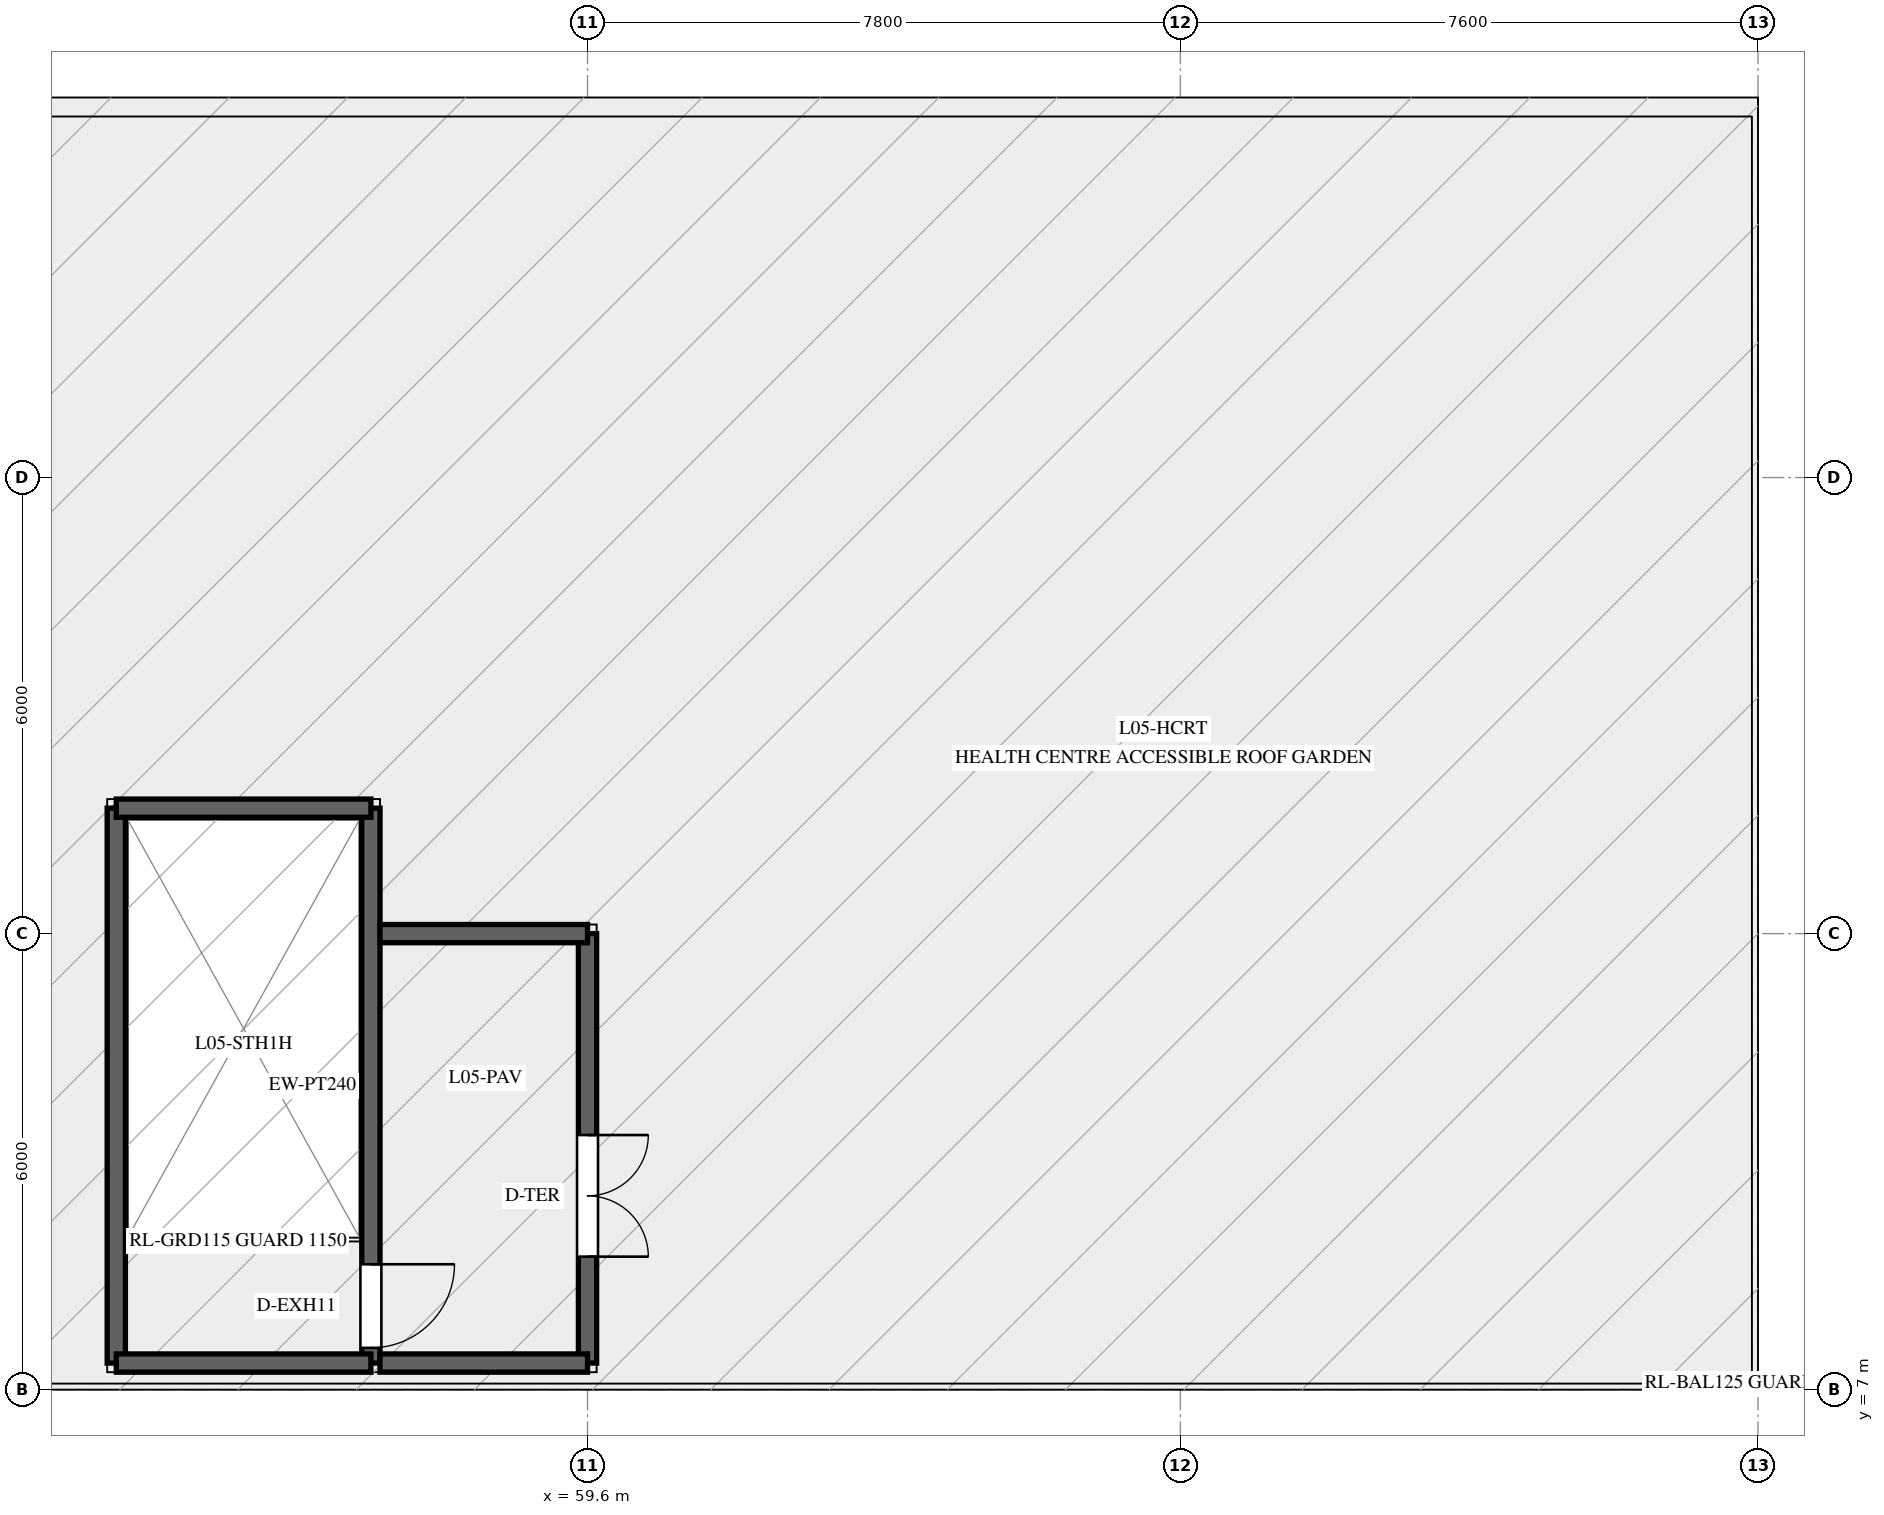
"""IFC4 building model, lengths in metres.
Left out: names, types, materials, properties, quantities, classifications, styles, units other than length and angle.
Written with IfcOpenShell. Run it as: python <this file> out.ifc"""

import sys

from ifc_helpers import new_model, si_unit, direction, frame, frame_2d, origin, place, context, subcontext, project, spatial, rectangle, extrude, element, fill, save


model = new_model("IFC4")
c1 = context("Model", 3, precision=1e-05, world=origin(), true_north=direction((0.0, 1.0)))
c2 = subcontext(c1, "Body", "Model", "MODEL_VIEW")
j1 = project(units=[si_unit("LENGTHUNIT", "METRE"), si_unit("PLANEANGLEUNIT", "RADIAN")], contexts=[c1])
p1 = place(None, origin())
s1 = spatial("IfcSite", under=j1, at=p1, CompositionType="ELEMENT")
p2 = place(p1, origin())
s2 = spatial("IfcBuilding", under=s1, at=p2, CompositionType="ELEMENT")
p3 = place(p2, frame((0.0, 0.0, 24.0)))
s3 = spatial("IfcBuildingStorey", under=s2, at=p3, CompositionType="ELEMENT", Elevation=24.0)
p4 = place(p3, frame((56.75, 7.35, 0.0), z_axis=(0.0, 0.0, 1.0), x_axis=(0.0, 1.0, 0.0)))
e1 = element("IfcWall", 1, at=p4, inside=s3, PredefinedType="STANDARD", context=c2, shape_type="SweptSolid", body=[
    extrude(rectangle(XDim=7.3, YDim=0.24, at=frame_2d((3.65, 0.0))), origin(), (0.0, 0.0, 1.0), 3.4),
])
p5 = place(p4, frame((0.2, 0.0, 0.0)))
e2 = element("IfcOpeningElement", 2, at=p5, cuts=e1, PredefinedType="OPENING", context=c2, shape_type="SweptSolid", body=[
    extrude(rectangle(XDim=1.1, YDim=2.2, at=frame_2d((0.55, 1.1))), frame((0.0, 0.13, 0.0), z_axis=(0.0, -1.0, 0.0), x_axis=(1.0, 0.0, 0.0)), (0.0, 0.0, 1.0), 0.26),
])
p6 = place(p3, frame((53.4, 14.65, 0.0), z_axis=(0.0, 0.0, 1.0), x_axis=(0.0, -1.0, 0.0)))
e3 = element("IfcWall", 3, at=p6, inside=s3, PredefinedType="STANDARD", context=c2, shape_type="SweptSolid", body=[
    extrude(rectangle(XDim=7.3, YDim=0.24, at=frame_2d((3.65, 0.0))), origin(), (0.0, 0.0, 1.0), 3.4),
])
for number, where, z_axis, x_axis in (
    (4, (53.4, 7.35, 0.0), (0.0, 0.0, 1.0), (1.0, 0.0, 0.0)),
    (5, (56.75, 14.65, 0.0), (0.0, 0.0, 1.0), (-1.0, 0.0, 0.0)),
):
    element("IfcWall", number, at=place(p3, frame(where, z_axis=z_axis, x_axis=x_axis)), inside=s3, PredefinedType="STANDARD", context=c2, shape_type="SweptSolid", body=[
        extrude(rectangle(XDim=3.35, YDim=0.24, at=frame_2d((1.675, 0.0))), origin(), (0.0, 0.0, 1.0), 3.4),
    ])
p7 = place(p3, frame((59.6, 7.35, 0.0), z_axis=(0.0, 0.0, 1.0), x_axis=(0.0, 1.0, 0.0)))
e6 = element("IfcWall", 6, at=p7, inside=s3, PredefinedType="STANDARD", context=c2, shape_type="SweptSolid", body=[
    extrude(rectangle(XDim=5.65, YDim=0.24, at=frame_2d((2.825, 0.0))), origin(), (0.0, 0.0, 1.0), 3.4),
])
p8 = place(p7, frame((1.4, 0.0, 0.0)))
e7 = element("IfcOpeningElement", 7, at=p8, cuts=e6, PredefinedType="OPENING", context=c2, shape_type="SweptSolid", body=[
    extrude(rectangle(XDim=1.6, YDim=2.25, at=frame_2d((0.8, 1.125))), frame((0.0, 0.13, 0.0), z_axis=(0.0, -1.0, 0.0), x_axis=(1.0, 0.0, 0.0)), (0.0, 0.0, 1.0), 0.26),
])
for number, where, z_axis, x_axis in (
    (8, (59.6, 13.0, 0.0), (0.0, 0.0, 1.0), (-1.0, 0.0, 0.0)),
    (9, (56.87, 7.35, 0.0), (0.0, 0.0, 1.0), (1.0, 0.0, 0.0)),
):
    element("IfcWall", number, at=place(p3, frame(where, z_axis=z_axis, x_axis=x_axis)), inside=s3, PredefinedType="STANDARD", context=c2, shape_type="SweptSolid", body=[
        extrude(rectangle(XDim=2.73, YDim=0.24, at=frame_2d((1.365, 0.0))), origin(), (0.0, 0.0, 1.0), 3.4),
    ])
p9 = place(p5, frame((1.1, 0.0, 0.0), z_axis=(0.0, 0.0, 1.0), x_axis=(-1.0, 0.0, 0.0)))
e10 = element("IfcDoor", 10, at=p9, inside=s3, OperationType="SINGLE_SWING_RIGHT", PredefinedType="DOOR", context=c2, shape_type="SweptSolid", body=[
    extrude(rectangle(XDim=1.1, YDim=2.2, at=frame_2d((0.55, 1.1))), frame((0.0, 0.025, 0.0), z_axis=(0.0, -1.0, 0.0), x_axis=(1.0, 0.0, 0.0)), (0.0, 0.0, 1.0), 0.05),
])
fill(e2, e10)
p10 = place(p8, frame((1.6, 0.0, 0.0), z_axis=(0.0, 0.0, 1.0), x_axis=(-1.0, 0.0, 0.0)))
e11 = element("IfcDoor", 11, at=p10, inside=s3, OperationType="DOUBLE_DOOR_SINGLE_SWING", PredefinedType="DOOR", context=c2, shape_type="SweptSolid", body=[
    extrude(rectangle(XDim=1.6, YDim=2.25, at=frame_2d((0.8, 1.125))), frame((0.0, 0.025, 0.0), z_axis=(0.0, -1.0, 0.0), x_axis=(1.0, 0.0, 0.0)), (0.0, 0.0, 1.0), 0.05),
])
fill(e7, e11)
save(model, sys.argv[1])
